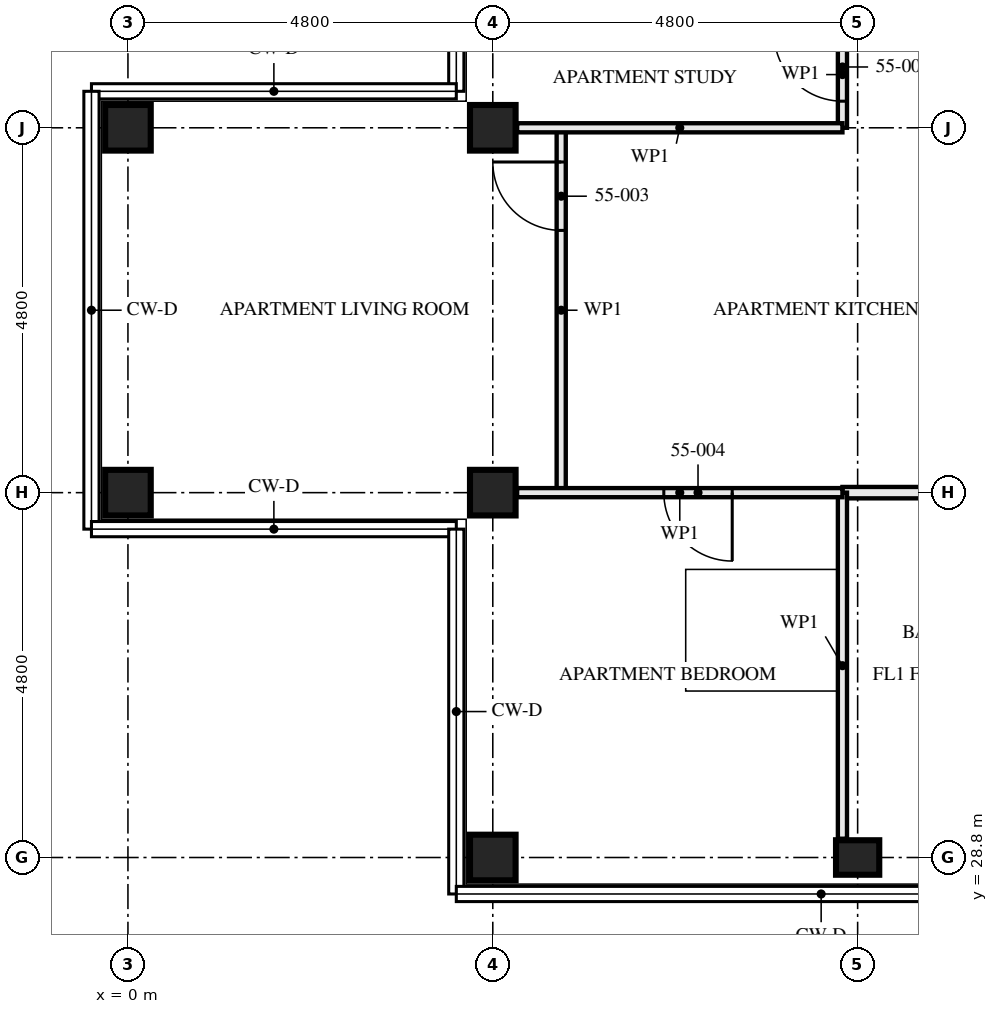
"""IFC4 building model, lengths in metres.
Left out: names, types, materials, properties, quantities, classifications, styles, units other than length and angle.
Written with IfcOpenShell. Run it as: python <this file> out.ifc"""

import sys

from ifc_helpers import new_model, si_unit, direction, frame, frame_2d, origin, origin_2d, place, context, subcontext, project, spatial, rectangle, hollow_rectangle, i_section, extrude, element, fill, save


model = new_model("IFC4")
c1 = context("Model", 3, precision=1e-05, world=origin(), true_north=direction((0.0, 1.0)))
c2 = subcontext(c1, "Body", "Model", "MODEL_VIEW")
j1 = project(units=[si_unit("LENGTHUNIT", "METRE"), si_unit("PLANEANGLEUNIT", "RADIAN")], contexts=[c1])
p1 = place(None, origin())
s1 = spatial("IfcSite", under=j1, at=p1, CompositionType="ELEMENT")
p2 = place(p1, origin())
s2 = spatial("IfcBuilding", under=s1, at=p2, CompositionType="ELEMENT")
p3 = place(p2, frame((0.0, 0.0, 201.5)))
s3 = spatial("IfcBuildingStorey", under=s2, at=p3, CompositionType="ELEMENT", Elevation=201.5)
for number, where, z_axis, x_axis in (
    (1, (0.0, 33.6, 0.0), (0.0, 0.0, 1.0), (0.0, 1.0, 0.0)),
    (2, (0.0, 38.4, 0.0), (0.0, 0.0, 1.0), (0.0, 1.0, 0.0)),
    (3, (4.8, 28.8, 0.0), (0.0, 0.0, 1.0), (0.0, 1.0, 0.0)),
    (4, (4.8, 33.6, 0.0), (0.0, 0.0, 1.0), (0.0, 1.0, 0.0)),
    (5, (4.8, 38.4, 0.0), (0.0, 0.0, 1.0), (0.0, 1.0, 0.0)),
):
    element("IfcColumn", number, at=place(p3, frame(where, z_axis=z_axis, x_axis=x_axis)), inside=s3, PredefinedType="COLUMN", context=c2, shape_type="SweptSolid", body=[
        extrude(hollow_rectangle(XDim=0.6, YDim=0.6, WallThickness=0.05, at=origin_2d()), origin(), (0.0, 0.0, 1.0), 3.5),
    ])
p4 = place(p3, frame((9.6, 28.8, 0.0), z_axis=(0.0, 0.0, 1.0), x_axis=(0.0, 1.0, 0.0)))
e6 = element("IfcColumn", 6, at=p4, inside=s3, PredefinedType="COLUMN", context=c2, shape_type="SweptSolid", body=[
    extrude(i_section(OverallWidth=0.454, OverallDepth=0.569, WebThickness=0.078, FlangeThickness=0.125, FilletRadius=0.015, at=origin_2d()), origin(), (0.0, 0.0, 1.0), 3.5),
])
p5 = place(p3, frame((9.4, 33.6, 0.0), z_axis=(0.0, 0.0, 1.0), x_axis=(1.0, 0.0, 0.0)))
e7 = element("IfcWall", 7, at=p5, inside=s3, PredefinedType="PARTITIONING", context=c2, shape_type="SweptSolid", body=[
    extrude(rectangle(XDim=3.0, YDim=0.15, at=frame_2d((1.5, 0.0))), origin(), (0.0, 0.0, 1.0), 2.55),
])
p6 = place(p5, frame((1.05, 0.0, 0.0)))
e8 = element("IfcOpeningElement", 8, at=p6, cuts=e7, PredefinedType="OPENING", context=c2, shape_type="SweptSolid", body=[
    extrude(rectangle(XDim=0.9, YDim=2.1, at=frame_2d((0.45, 1.05))), frame((0.0, 0.085, 0.0), z_axis=(0.0, -1.0, 0.0), x_axis=(1.0, 0.0, 0.0)), (0.0, 0.0, 1.0), 0.171),
])
p7 = place(p3, frame((9.4, 39.8, 0.0), z_axis=(0.0, 0.0, 1.0), x_axis=(0.0, -1.0, 0.0)))
e9 = element("IfcWall", 9, at=p7, inside=s3, PredefinedType="PARTITIONING", context=c2, shape_type="SweptSolid", body=[
    extrude(rectangle(XDim=1.4, YDim=0.12, at=frame_2d((0.7, 0.0))), origin(), (0.0, 0.0, 1.0), 3.33),
])
p8 = place(p7, frame((0.15, 0.0, 0.0)))
e10 = element("IfcOpeningElement", 10, at=p8, cuts=e9, PredefinedType="OPENING", context=c2, shape_type="SweptSolid", body=[
    extrude(rectangle(XDim=0.9, YDim=2.1, at=frame_2d((0.45, 1.05))), frame((0.0, 0.071, 0.0), z_axis=(0.0, -1.0, 0.0), x_axis=(1.0, 0.0, 0.0)), (0.0, 0.0, 1.0), 0.141),
])
p9 = place(p3, frame((5.7, 38.4, 0.0), z_axis=(0.0, 0.0, 1.0), x_axis=(0.0, -1.0, 0.0)))
e11 = element("IfcWall", 11, at=p9, inside=s3, PredefinedType="PARTITIONING", context=c2, shape_type="SweptSolid", body=[
    extrude(rectangle(XDim=4.8, YDim=0.12, at=frame_2d((2.4, 0.0))), origin(), (0.0, 0.0, 1.0), 3.33),
])
p10 = place(p9, frame((0.45, 0.0, 0.0)))
e12 = element("IfcOpeningElement", 12, at=p10, cuts=e11, PredefinedType="OPENING", context=c2, shape_type="SweptSolid", body=[
    extrude(rectangle(XDim=0.9, YDim=2.1, at=frame_2d((0.45, 1.05))), frame((0.0, 0.071, 0.0), z_axis=(0.0, -1.0, 0.0), x_axis=(1.0, 0.0, 0.0)), (0.0, 0.0, 1.0), 0.141),
])
p11 = place(p3, frame((9.4, 33.6, 0.0), z_axis=(0.0, 0.0, 1.0), x_axis=(0.0, -1.0, 0.0)))
e13 = element("IfcWall", 13, at=p11, inside=s3, PredefinedType="PARTITIONING", context=c2, shape_type="SweptSolid", body=[
    extrude(rectangle(XDim=4.553, YDim=0.12, at=frame_2d((2.276, 0.0))), origin(), (0.0, 0.0, 1.0), 3.33),
])
p12 = place(p3, frame((5.12, 38.4, 0.0), z_axis=(0.0, 0.0, 1.0), x_axis=(1.0, 0.0, 0.0)))
e14 = element("IfcWall", 14, at=p12, inside=s3, PredefinedType="PARTITIONING", context=c2, shape_type="SweptSolid", body=[
    extrude(rectangle(XDim=4.28, YDim=0.12, at=frame_2d((2.14, 0.0))), origin(), (0.0, 0.0, 1.0), 2.55),
])
p13 = place(p3, frame((5.12, 33.6, 0.0), z_axis=(0.0, 0.0, 1.0), x_axis=(1.0, 0.0, 0.0)))
e15 = element("IfcWall", 15, at=p13, inside=s3, PredefinedType="PARTITIONING", context=c2, shape_type="SweptSolid", body=[
    extrude(rectangle(XDim=4.28, YDim=0.12, at=frame_2d((2.14, 0.0))), origin(), (0.0, 0.0, 1.0), 2.55),
])
p14 = place(p13, frame((1.93, 0.0, 0.0)))
e16 = element("IfcOpeningElement", 16, at=p14, cuts=e15, PredefinedType="OPENING", context=c2, shape_type="SweptSolid", body=[
    extrude(rectangle(XDim=0.9, YDim=2.1, at=frame_2d((0.45, 1.05))), frame((0.0, 0.071, 0.0), z_axis=(0.0, -1.0, 0.0), x_axis=(1.0, 0.0, 0.0)), (0.0, 0.0, 1.0), 0.141),
])
p15 = place(p8, frame((0.9, 0.0, 0.0), z_axis=(0.0, 0.0, 1.0), x_axis=(-1.0, 0.0, 0.0)))
e17 = element("IfcDoor", 17, at=p15, inside=s3, OperationType="SINGLE_SWING_LEFT", PredefinedType="DOOR", context=c2, shape_type="SweptSolid", body=[
    extrude(rectangle(XDim=0.9, YDim=2.1, at=frame_2d((0.45, 1.05))), frame((0.0, 0.022, 0.0), z_axis=(0.0, -1.0, 0.0), x_axis=(1.0, 0.0, 0.0)), (0.0, 0.0, 1.0), 0.044),
])
fill(e10, e17)
p16 = place(p10, frame((0.9, 0.0, 0.0), z_axis=(0.0, 0.0, 1.0), x_axis=(-1.0, 0.0, 0.0)))
e18 = element("IfcDoor", 18, at=p16, inside=s3, OperationType="SINGLE_SWING_LEFT", PredefinedType="DOOR", context=c2, shape_type="SweptSolid", body=[
    extrude(rectangle(XDim=0.9, YDim=2.1, at=frame_2d((0.45, 1.05))), frame((0.0, 0.022, 0.0), z_axis=(0.0, -1.0, 0.0), x_axis=(1.0, 0.0, 0.0)), (0.0, 0.0, 1.0), 0.044),
])
fill(e12, e18)
p17 = place(p14, frame((0.9, 0.0, 0.0), z_axis=(0.0, 0.0, 1.0), x_axis=(-1.0, 0.0, 0.0)))
e19 = element("IfcDoor", 19, at=p17, inside=s3, OperationType="SINGLE_SWING_RIGHT", PredefinedType="DOOR", context=c2, shape_type="SweptSolid", body=[
    extrude(rectangle(XDim=0.9, YDim=2.1, at=frame_2d((0.45, 1.05))), frame((0.0, 0.022, 0.0), z_axis=(0.0, -1.0, 0.0), x_axis=(1.0, 0.0, 0.0)), (0.0, 0.0, 1.0), 0.044),
])
fill(e16, e19)
save(model, sys.argv[1])
